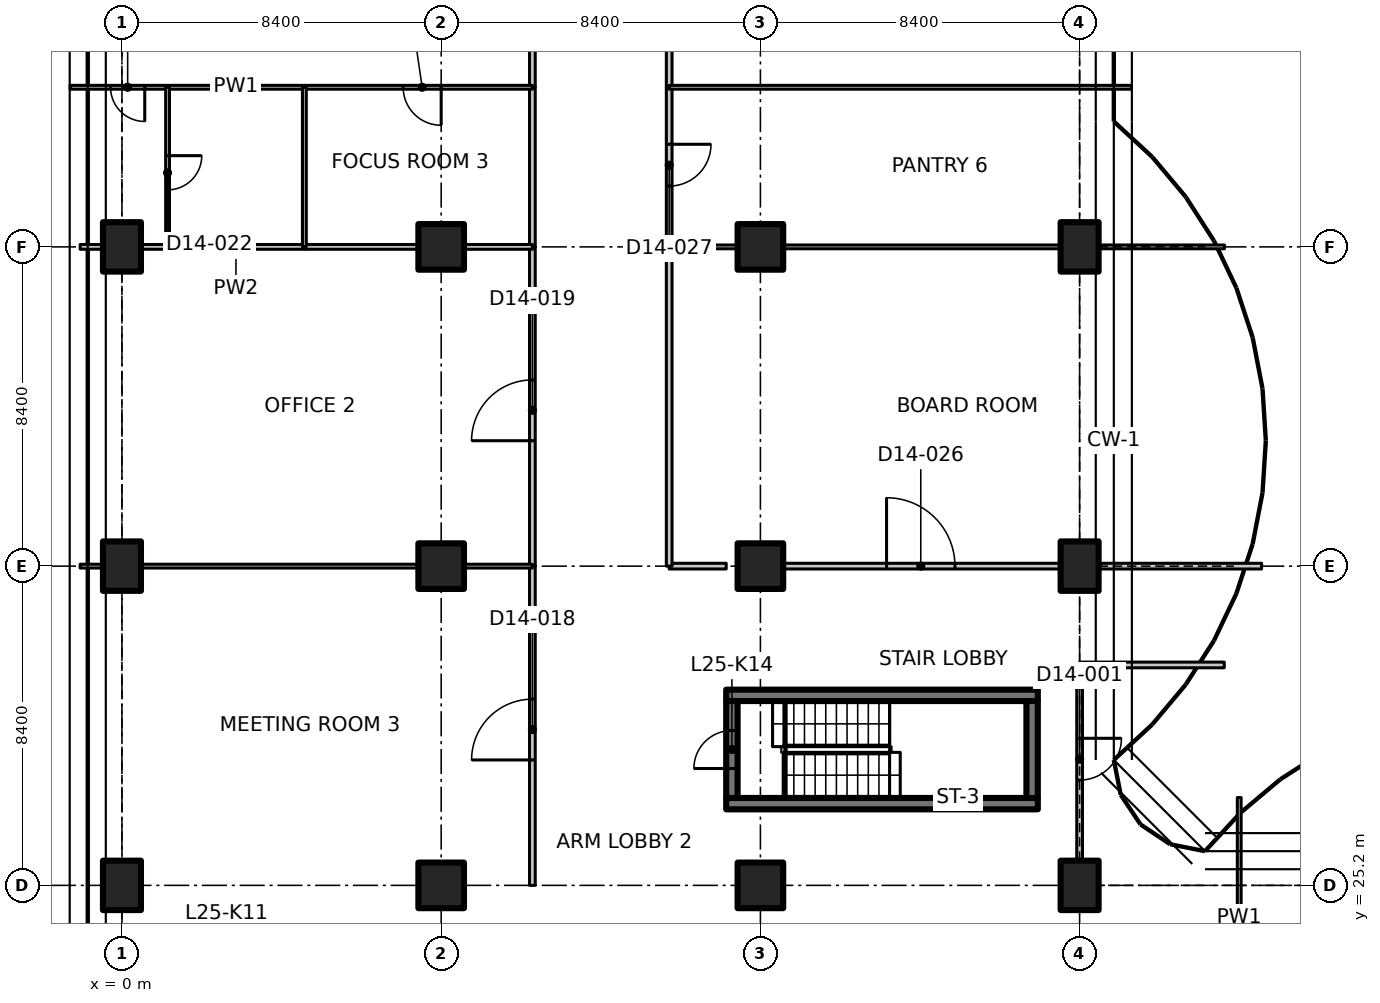
"""IFC4 building model, lengths in metres.
Left out: names, types, materials, properties, quantities, classifications, styles, units other than length and angle.
Written with IfcOpenShell. Run it as: python <this file> out.ifc"""

import sys

from ifc_helpers import new_model, si_unit, direction, frame, frame_2d, origin, origin_2d, place, context, subcontext, project, spatial, polyline, rectangle, outline, extrude, element, fill, save


model = new_model("IFC4")
c1 = context("Model", 3, precision=1e-05, world=origin(), true_north=direction((0.0, 1.0)))
c2 = subcontext(c1, "Body", "Model", "MODEL_VIEW")
j1 = project(units=[si_unit("LENGTHUNIT", "METRE"), si_unit("PLANEANGLEUNIT", "RADIAN")], contexts=[c1])
p1 = place(None, origin())
s1 = spatial("IfcSite", under=j1, at=p1, CompositionType="ELEMENT")
p2 = place(p1, origin())
s2 = spatial("IfcBuilding", under=s1, at=p2, CompositionType="ELEMENT")
p3 = place(p2, frame((0.0, 0.0, 106.1)))
s3 = spatial("IfcBuildingStorey", under=s2, at=p3, CompositionType="ELEMENT", Elevation=106.1)
for number, where, z_axis, x_axis in (
    (1, (0.0, 25.2, 0.0), (0.0, 0.0, 1.0), (1.0, 0.0, 0.0)),
    (2, (0.0, 33.6, 0.0), (0.0, 0.0, 1.0), (1.0, 0.0, 0.0)),
    (3, (0.0, 42.0, 0.0), (0.0, 0.0, 1.0), (1.0, 0.0, 0.0)),
):
    element("IfcColumn", number, at=place(p3, frame(where, z_axis=z_axis, x_axis=x_axis)), inside=s3, PredefinedType="COLUMN", context=c2, shape_type="SweptSolid", body=[
        extrude(rectangle(XDim=1.0, YDim=1.3, at=origin_2d()), origin(), (0.0, 0.0, 1.0), 3.35),
    ])
for number, where, z_axis, x_axis in (
    (4, (8.4, 25.2, 0.0), (0.0, 0.0, 1.0), (1.0, 0.0, 0.0)),
    (5, (8.4, 33.6, 0.0), (0.0, 0.0, 1.0), (1.0, 0.0, 0.0)),
    (6, (8.4, 42.0, 0.0), (0.0, 0.0, 1.0), (1.0, 0.0, 0.0)),
    (7, (16.8, 25.2, 0.0), (0.0, 0.0, 1.0), (1.0, 0.0, 0.0)),
    (8, (16.8, 33.6, 0.0), (0.0, 0.0, 1.0), (1.0, 0.0, 0.0)),
    (9, (16.8, 42.0, 0.0), (0.0, 0.0, 1.0), (1.0, 0.0, 0.0)),
):
    element("IfcColumn", number, at=place(p3, frame(where, z_axis=z_axis, x_axis=x_axis)), inside=s3, PredefinedType="COLUMN", context=c2, shape_type="SweptSolid", body=[
        extrude(rectangle(XDim=1.2, YDim=1.2, at=origin_2d()), origin(), (0.0, 0.0, 1.0), 3.35),
    ])
for number, where, z_axis, x_axis in (
    (10, (25.2, 25.2, 0.0), (0.0, 0.0, 1.0), (1.0, 0.0, 0.0)),
    (11, (25.2, 33.6, 0.0), (0.0, 0.0, 1.0), (1.0, 0.0, 0.0)),
    (12, (25.2, 42.0, 0.0), (0.0, 0.0, 1.0), (1.0, 0.0, 0.0)),
):
    element("IfcColumn", number, at=place(p3, frame(where, z_axis=z_axis, x_axis=x_axis)), inside=s3, PredefinedType="COLUMN", context=c2, shape_type="SweptSolid", body=[
        extrude(rectangle(XDim=1.0, YDim=1.3, at=origin_2d()), origin(), (0.0, 0.0, 1.0), 3.35),
    ])
for number, where, z_axis, x_axis in (
    (13, (15.9, 27.35, 0.0), (0.0, 0.0, 1.0), (1.0, 0.0, 0.0)),
    (14, (15.9, 30.2, 0.0), (0.0, 0.0, 1.0), (1.0, 0.0, 0.0)),
):
    element("IfcWall", number, at=place(p3, frame(where, z_axis=z_axis, x_axis=x_axis)), inside=s3, PredefinedType="SHEAR", context=c2, shape_type="SweptSolid", body=[
        extrude(rectangle(XDim=8.2, YDim=0.3, at=frame_2d((4.1, 0.0))), origin(), (0.0, 0.0, 1.0), 3.35),
    ])
p4 = place(p3, frame((16.05, 27.5, 0.0), z_axis=(0.0, 0.0, 1.0), x_axis=(0.0, 1.0, 0.0)))
e15 = element("IfcWall", 15, at=p4, inside=s3, PredefinedType="SHEAR", context=c2, shape_type="SweptSolid", body=[
    extrude(rectangle(XDim=2.55, YDim=0.3, at=frame_2d((1.275, 0.0))), origin(), (0.0, 0.0, 1.0), 3.35),
])
p5 = place(p4, frame((0.775, 0.0, 0.0)))
e16 = element("IfcOpeningElement", 16, at=p5, cuts=e15, PredefinedType="OPENING", context=c2, shape_type="SweptSolid", body=[
    extrude(rectangle(XDim=1.0, YDim=2.1, at=frame_2d((0.5, 1.05))), frame((0.0, 0.16, 0.0), z_axis=(0.0, -1.0, 0.0), x_axis=(1.0, 0.0, 0.0)), (0.0, 0.0, 1.0), 0.32),
])
p6 = place(p3, frame((23.95, 27.5, 0.0), z_axis=(0.0, 0.0, 1.0), x_axis=(0.0, 1.0, 0.0)))
e17 = element("IfcWall", 17, at=p6, inside=s3, PredefinedType="SHEAR", context=c2, shape_type="SweptSolid", body=[
    extrude(rectangle(XDim=2.55, YDim=0.3, at=frame_2d((1.275, 0.0))), origin(), (0.0, 0.0, 1.0), 3.35),
])
p7 = place(p3, frame((29.4, 27.511, 0.0), z_axis=(0.0, 0.0, 1.0), x_axis=(0.0, -1.0, 0.0)))
e18 = element("IfcWall", 18, at=p7, inside=s3, PredefinedType="PARTITIONING", context=c2, shape_type="SweptSolid", body=[
    extrude(outline(polyline([(0.0, 0.0), (6.311, 0.0), (6.311, 3.33), (2.761, 3.33), (2.759, 2.98), (1.863, 2.98), (1.861, 3.33), (0.236, 3.33), (0.0, 3.33), (0.0, 0.0)])), frame((0.0, 0.05, 0.0), z_axis=(0.0, -1.0, 0.0), x_axis=(1.0, 0.0, 0.0)), (0.0, 0.0, 1.0), 0.1),
])
p8 = place(p3, frame((25.2, 31.0, 0.0), z_axis=(0.0, 0.0, 1.0), x_axis=(0.0, -1.0, 0.0)))
e19 = element("IfcWall", 19, at=p8, inside=s3, PredefinedType="PARTITIONING", context=c2, shape_type="SweptSolid", body=[
    extrude(outline(polyline([(0.0, 0.0), (5.13, 0.0), (5.13, 2.98), (0.0, 2.98), (0.0, 0.0)])), frame((0.0, 0.075, 0.0), z_axis=(0.0, -1.0, 0.0), x_axis=(1.0, 0.0, 0.0)), (0.0, 0.0, 1.0), 0.15),
])
p9 = place(p8, frame((1.93, 0.0, 0.0)))
e20 = element("IfcOpeningElement", 20, at=p9, cuts=e19, PredefinedType="OPENING", context=c2, shape_type="SweptSolid", body=[
    extrude(rectangle(XDim=1.1, YDim=2.1, at=frame_2d((0.55, 1.05))), frame((0.0, 0.085, 0.0), z_axis=(0.0, -1.0, 0.0), x_axis=(1.0, 0.0, 0.0)), (0.0, 0.0, 1.0), 0.17),
])
p10 = place(p3, frame((25.2, 31.0, 0.0), z_axis=(0.0, 0.0, 1.0), x_axis=(1.0, 0.0, 0.0)))
e21 = element("IfcWall", 21, at=p10, inside=s3, PredefinedType="PARTITIONING", context=c2, shape_type="SweptSolid", body=[
    extrude(rectangle(XDim=3.806, YDim=0.15, at=frame_2d((1.903, 0.0))), origin(), (0.0, 0.0, 1.0), 2.98),
])
p11 = place(p3, frame((10.8, 25.2, 0.0), z_axis=(0.0, 0.0, 1.0), x_axis=(0.0, 1.0, 0.0)))
e22 = element("IfcWall", 22, at=p11, inside=s3, PredefinedType="PARTITIONING", context=c2, shape_type="SweptSolid", body=[
    extrude(rectangle(XDim=8.4, YDim=0.15, at=frame_2d((4.2, 0.0))), origin(), (0.0, 0.0, 1.0), 3.33),
])
p12 = place(p11, frame((3.3, 0.0, 0.0)))
e23 = element("IfcOpeningElement", 23, at=p12, cuts=e22, PredefinedType="OPENING", context=c2, shape_type="SweptSolid", body=[
    extrude(rectangle(XDim=1.6, YDim=2.1, at=frame_2d((0.8, 1.05))), frame((0.0, 0.085, 0.0), z_axis=(0.0, -1.0, 0.0), x_axis=(1.0, 0.0, 0.0)), (0.0, 0.0, 1.0), 0.17),
])
p13 = place(p3, frame((14.4, 33.6, 0.0), z_axis=(0.0, 0.0, 1.0), x_axis=(1.0, 0.0, 0.0)))
e24 = element("IfcWall", 24, at=p13, inside=s3, PredefinedType="PARTITIONING", context=c2, shape_type="SweptSolid", body=[
    extrude(rectangle(XDim=1.5, YDim=0.15, at=frame_2d((0.75, 0.0))), origin(), (0.0, 0.0, 1.0), 3.33),
])
p14 = place(p3, frame((17.42, 33.6, 0.0), z_axis=(0.0, 0.0, 1.0), x_axis=(1.0, 0.0, 0.0)))
e25 = element("IfcWall", 25, at=p14, inside=s3, PredefinedType="PARTITIONING", context=c2, shape_type="SweptSolid", body=[
    extrude(rectangle(XDim=7.26, YDim=0.15, at=frame_2d((3.63, 0.0))), origin(), (0.0, 0.0, 1.0), 3.33),
])
p15 = place(p14, frame((2.7, 0.0, 0.0)))
e26 = element("IfcOpeningElement", 26, at=p15, cuts=e25, PredefinedType="OPENING", context=c2, shape_type="SweptSolid", body=[
    extrude(rectangle(XDim=1.8, YDim=2.1, at=frame_2d((0.9, 1.05))), frame((0.0, 0.085, 0.0), z_axis=(0.0, -1.0, 0.0), x_axis=(1.0, 0.0, 0.0)), (0.0, 0.0, 1.0), 0.17),
])
p16 = place(p3, frame((25.72, 33.6, 0.0), z_axis=(0.0, 0.0, 1.0), x_axis=(1.0, 0.0, 0.0)))
e27 = element("IfcWall", 27, at=p16, inside=s3, PredefinedType="PARTITIONING", context=c2, shape_type="SweptSolid", body=[
    extrude(rectangle(XDim=4.268, YDim=0.15, at=frame_2d((2.134, 0.0))), origin(), (0.0, 0.0, 1.0), 2.98),
])
p17 = place(p3, frame((10.8, 33.6, 0.0), z_axis=(0.0, 0.0, 1.0), x_axis=(0.0, 1.0, 0.0)))
e28 = element("IfcWall", 28, at=p17, inside=s3, PredefinedType="PARTITIONING", context=c2, shape_type="SweptSolid", body=[
    extrude(rectangle(XDim=8.4, YDim=0.15, at=frame_2d((4.2, 0.0))), origin(), (0.0, 0.0, 1.0), 3.33),
])
p18 = place(p17, frame((3.3, 0.0, 0.0)))
e29 = element("IfcOpeningElement", 29, at=p18, cuts=e28, PredefinedType="OPENING", context=c2, shape_type="SweptSolid", body=[
    extrude(rectangle(XDim=1.6, YDim=2.1, at=frame_2d((0.8, 1.05))), frame((0.0, 0.085, 0.0), z_axis=(0.0, -1.0, 0.0), x_axis=(1.0, 0.0, 0.0)), (0.0, 0.0, 1.0), 0.17),
])
p19 = place(p3, frame((10.8, 46.2, 0.0), z_axis=(0.0, 0.0, 1.0), x_axis=(0.0, 1.0, 0.0)))
e30 = element("IfcWall", 30, at=p19, inside=s3, PredefinedType="PARTITIONING", context=c2, shape_type="SweptSolid", body=[
    extrude(rectangle(XDim=8.4, YDim=0.15, at=frame_2d((4.2, 0.0))), origin(), (0.0, 0.0, 1.0), 3.33),
])
p20 = place(p19, frame((3.3, 0.0, 0.0)))
e31 = element("IfcOpeningElement", 31, at=p20, cuts=e30, PredefinedType="OPENING", context=c2, shape_type="SweptSolid", body=[
    extrude(rectangle(XDim=1.6, YDim=2.1, at=frame_2d((0.8, 1.05))), frame((0.0, 0.085, 0.0), z_axis=(0.0, -1.0, 0.0), x_axis=(1.0, 0.0, 0.0)), (0.0, 0.0, 1.0), 0.17),
])
p21 = place(p3, frame((10.8, 42.0, 0.0), z_axis=(0.0, 0.0, 1.0), x_axis=(0.0, 1.0, 0.0)))
e32 = element("IfcWall", 32, at=p21, inside=s3, PredefinedType="PARTITIONING", context=c2, shape_type="SweptSolid", body=[
    extrude(rectangle(XDim=4.2, YDim=0.15, at=frame_2d((2.1, 0.0))), origin(), (0.0, 0.0, 1.0), 3.33),
])
p22 = place(p3, frame((14.4, 42.0, 0.0), z_axis=(0.0, 0.0, 1.0), x_axis=(0.0, -1.0, 0.0)))
e33 = element("IfcWall", 33, at=p22, inside=s3, PredefinedType="PARTITIONING", context=c2, shape_type="SweptSolid", body=[
    extrude(rectangle(XDim=8.4, YDim=0.15, at=frame_2d((4.2, 0.0))), origin(), (0.0, 0.0, 1.0), 3.33),
])
p23 = place(p3, frame((14.4, 46.2, 0.0), z_axis=(0.0, 0.0, 1.0), x_axis=(0.0, -1.0, 0.0)))
e34 = element("IfcWall", 34, at=p23, inside=s3, PredefinedType="PARTITIONING", context=c2, shape_type="SweptSolid", body=[
    extrude(rectangle(XDim=4.2, YDim=0.15, at=frame_2d((2.1, 0.0))), origin(), (0.0, 0.0, 1.0), 3.33),
])
p24 = place(p23, frame((1.5, 0.0, 0.0)))
e35 = element("IfcOpeningElement", 35, at=p24, cuts=e34, PredefinedType="OPENING", context=c2, shape_type="SweptSolid", body=[
    extrude(rectangle(XDim=1.1, YDim=2.1, at=frame_2d((0.55, 1.05))), frame((0.0, 0.085, 0.0), z_axis=(0.0, -1.0, 0.0), x_axis=(1.0, 0.0, 0.0)), (0.0, 0.0, 1.0), 0.17),
])
p25 = place(p3, frame((14.4, 50.4, 0.0), z_axis=(0.0, 0.0, 1.0), x_axis=(0.0, -1.0, 0.0)))
e36 = element("IfcWall", 36, at=p25, inside=s3, PredefinedType="PARTITIONING", context=c2, shape_type="SweptSolid", body=[
    extrude(rectangle(XDim=4.2, YDim=0.15, at=frame_2d((2.1, 0.0))), origin(), (0.0, 0.0, 1.0), 3.33),
])
p26 = place(p25, frame((1.5, 0.0, 0.0)))
e37 = element("IfcOpeningElement", 37, at=p26, cuts=e36, PredefinedType="OPENING", context=c2, shape_type="SweptSolid", body=[
    extrude(rectangle(XDim=1.1, YDim=2.1, at=frame_2d((0.55, 1.05))), frame((0.0, 0.085, 0.0), z_axis=(0.0, -1.0, 0.0), x_axis=(1.0, 0.0, 0.0)), (0.0, 0.0, 1.0), 0.17),
])
p27 = place(p3, frame((-1.1, 33.6, 0.0), z_axis=(0.0, 0.0, 1.0), x_axis=(1.0, 0.0, 0.0)))
e38 = element("IfcWall", 38, at=p27, inside=s3, PredefinedType="PARTITIONING", context=c2, shape_type="SweptSolid", body=[
    extrude(rectangle(XDim=0.58, YDim=0.1, at=frame_2d((0.29, 0.0))), origin(), (0.0, 0.0, 1.0), 3.33),
])
p28 = place(p3, frame((0.52, 33.6, 0.0), z_axis=(0.0, 0.0, 1.0), x_axis=(1.0, 0.0, 0.0)))
e39 = element("IfcWall", 39, at=p28, inside=s3, PredefinedType="PARTITIONING", context=c2, shape_type="SweptSolid", body=[
    extrude(rectangle(XDim=7.26, YDim=0.1, at=frame_2d((3.63, 0.0))), origin(), (0.0, 0.0, 1.0), 3.33),
])
p29 = place(p3, frame((9.02, 33.6, 0.0), z_axis=(0.0, 0.0, 1.0), x_axis=(1.0, 0.0, 0.0)))
e40 = element("IfcWall", 40, at=p29, inside=s3, PredefinedType="PARTITIONING", context=c2, shape_type="SweptSolid", body=[
    extrude(rectangle(XDim=1.78, YDim=0.1, at=frame_2d((0.89, 0.0))), origin(), (0.0, 0.0, 1.0), 3.33),
])
p30 = place(p3, frame((-1.1, 42.0, 0.0), z_axis=(0.0, 0.0, 1.0), x_axis=(1.0, 0.0, 0.0)))
e41 = element("IfcWall", 41, at=p30, inside=s3, PredefinedType="PARTITIONING", context=c2, shape_type="SweptSolid", body=[
    extrude(rectangle(XDim=0.58, YDim=0.125, at=frame_2d((0.29, 0.0))), origin(), (0.0, 0.0, 1.0), 3.33),
])
p31 = place(p3, frame((0.52, 42.0, 0.0), z_axis=(0.0, 0.0, 1.0), x_axis=(1.0, 0.0, 0.0)))
e42 = element("IfcWall", 42, at=p31, inside=s3, PredefinedType="PARTITIONING", context=c2, shape_type="SweptSolid", body=[
    extrude(rectangle(XDim=0.68, YDim=0.125, at=frame_2d((0.34, 0.0))), origin(), (0.0, 0.0, 1.0), 3.33),
])
p32 = place(p3, frame((1.2, 42.0, 0.0), z_axis=(0.0, 0.0, 1.0), x_axis=(1.0, 0.0, 0.0)))
e43 = element("IfcWall", 43, at=p32, inside=s3, PredefinedType="PARTITIONING", context=c2, shape_type="SweptSolid", body=[
    extrude(rectangle(XDim=3.6, YDim=0.125, at=frame_2d((1.8, 0.0))), origin(), (0.0, 0.0, 1.0), 3.33),
])
p33 = place(p3, frame((4.8, 42.0, 0.0), z_axis=(0.0, 0.0, 1.0), x_axis=(1.0, 0.0, 0.0)))
e44 = element("IfcWall", 44, at=p33, inside=s3, PredefinedType="PARTITIONING", context=c2, shape_type="SweptSolid", body=[
    extrude(rectangle(XDim=2.98, YDim=0.125, at=frame_2d((1.49, 0.0))), origin(), (0.0, 0.0, 1.0), 3.33),
])
p34 = place(p3, frame((9.02, 42.0, 0.0), z_axis=(0.0, 0.0, 1.0), x_axis=(1.0, 0.0, 0.0)))
e45 = element("IfcWall", 45, at=p34, inside=s3, PredefinedType="PARTITIONING", context=c2, shape_type="SweptSolid", body=[
    extrude(rectangle(XDim=1.78, YDim=0.125, at=frame_2d((0.89, 0.0))), origin(), (0.0, 0.0, 1.0), 3.33),
])
p35 = place(p3, frame((1.2, 46.2, 0.0), z_axis=(0.0, 0.0, 1.0), x_axis=(-1.0, 0.0, 0.0)))
e46 = element("IfcWall", 46, at=p35, inside=s3, PredefinedType="PARTITIONING", context=c2, shape_type="SweptSolid", body=[
    extrude(rectangle(XDim=2.565, YDim=0.1, at=frame_2d((1.282, 0.0))), origin(), (0.0, 0.0, 1.0), 2.98),
])
p36 = place(p35, frame((0.6, 0.0, 0.0)))
e47 = element("IfcOpeningElement", 47, at=p36, cuts=e46, PredefinedType="OPENING", context=c2, shape_type="SweptSolid", body=[
    extrude(rectangle(XDim=0.9, YDim=2.1, at=frame_2d((0.45, 1.05))), frame((0.0, 0.06, 0.0), z_axis=(0.0, -1.0, 0.0), x_axis=(1.0, 0.0, 0.0)), (0.0, 0.0, 1.0), 0.12),
])
p37 = place(p3, frame((4.8, 46.2, 0.0), z_axis=(0.0, 0.0, 1.0), x_axis=(-1.0, 0.0, 0.0)))
e48 = element("IfcWall", 48, at=p37, inside=s3, PredefinedType="PARTITIONING", context=c2, shape_type="SweptSolid", body=[
    extrude(rectangle(XDim=3.6, YDim=0.1, at=frame_2d((1.8, 0.0))), origin(), (0.0, 0.0, 1.0), 3.33),
])
p38 = place(p3, frame((10.8, 46.2, 0.0), z_axis=(0.0, 0.0, 1.0), x_axis=(-1.0, 0.0, 0.0)))
e49 = element("IfcWall", 49, at=p38, inside=s3, PredefinedType="PARTITIONING", context=c2, shape_type="SweptSolid", body=[
    extrude(rectangle(XDim=6.0, YDim=0.1, at=frame_2d((3.0, 0.0))), origin(), (0.0, 0.0, 1.0), 3.33),
])
p39 = place(p38, frame((2.4, 0.0, 0.0)))
e50 = element("IfcOpeningElement", 50, at=p39, cuts=e49, PredefinedType="OPENING", context=c2, shape_type="SweptSolid", body=[
    extrude(rectangle(XDim=1.0, YDim=2.1, at=frame_2d((0.5, 1.05))), frame((0.0, 0.06, 0.0), z_axis=(0.0, -1.0, 0.0), x_axis=(1.0, 0.0, 0.0)), (0.0, 0.0, 1.0), 0.12),
])
p40 = place(p3, frame((1.2, 46.2, 0.0), z_axis=(0.0, 0.0, 1.0), x_axis=(0.0, -1.0, 0.0)))
e51 = element("IfcWall", 51, at=p40, inside=s3, PredefinedType="PARTITIONING", context=c2, shape_type="SweptSolid", body=[
    extrude(rectangle(XDim=4.2, YDim=0.1, at=frame_2d((2.1, 0.0))), origin(), (0.0, 0.0, 1.0), 3.33),
])
p41 = place(p40, frame((1.8, 0.0, 0.0)))
e52 = element("IfcOpeningElement", 52, at=p41, cuts=e51, PredefinedType="OPENING", context=c2, shape_type="SweptSolid", body=[
    extrude(rectangle(XDim=0.9, YDim=2.1, at=frame_2d((0.45, 1.05))), frame((0.0, 0.06, 0.0), z_axis=(0.0, -1.0, 0.0), x_axis=(1.0, 0.0, 0.0)), (0.0, 0.0, 1.0), 0.12),
])
p42 = place(p3, frame((4.8, 46.2, 0.0), z_axis=(0.0, 0.0, 1.0), x_axis=(0.0, -1.0, 0.0)))
e53 = element("IfcWall", 53, at=p42, inside=s3, PredefinedType="PARTITIONING", context=c2, shape_type="SweptSolid", body=[
    extrude(rectangle(XDim=4.2, YDim=0.1, at=frame_2d((2.1, 0.0))), origin(), (0.0, 0.0, 1.0), 3.33),
])
p43 = place(p3, frame((14.4, 42.0, 0.0), z_axis=(0.0, 0.0, 1.0), x_axis=(1.0, 0.0, 0.0)))
e54 = element("IfcWall", 54, at=p43, inside=s3, PredefinedType="PARTITIONING", context=c2, shape_type="SweptSolid", body=[
    extrude(rectangle(XDim=1.78, YDim=0.1, at=frame_2d((0.89, 0.0))), origin(), (0.0, 0.0, 1.0), 3.33),
])
p44 = place(p3, frame((17.42, 42.0, 0.0), z_axis=(0.0, 0.0, 1.0), x_axis=(1.0, 0.0, 0.0)))
e55 = element("IfcWall", 55, at=p44, inside=s3, PredefinedType="PARTITIONING", context=c2, shape_type="SweptSolid", body=[
    extrude(rectangle(XDim=7.26, YDim=0.1, at=frame_2d((3.63, 0.0))), origin(), (0.0, 0.0, 1.0), 3.33),
])
p45 = place(p3, frame((25.72, 42.0, 0.0), z_axis=(0.0, 0.0, 1.0), x_axis=(1.0, 0.0, 0.0)))
e56 = element("IfcWall", 56, at=p45, inside=s3, PredefinedType="PARTITIONING", context=c2, shape_type="SweptSolid", body=[
    extrude(rectangle(XDim=3.292, YDim=0.1, at=frame_2d((1.646, 0.0))), origin(), (0.0, 0.0, 1.0), 2.98),
])
p46 = place(p3, frame((14.4, 46.2, 0.0), z_axis=(0.0, 0.0, 1.0), x_axis=(1.0, 0.0, 0.0)))
e57 = element("IfcWall", 57, at=p46, inside=s3, PredefinedType="PARTITIONING", context=c2, shape_type="SweptSolid", body=[
    extrude(outline(polyline([(0.0, 0.0), (12.165, 0.0), (12.165, 3.33), (11.9, 3.33), (11.25, 3.33), (11.248, 2.98), (10.352, 2.98), (10.35, 3.33), (0.0, 3.33), (0.0, 0.0)])), frame((0.0, 0.05, 0.0), z_axis=(0.0, -1.0, 0.0), x_axis=(1.0, 0.0, 0.0)), (0.0, 0.0, 1.0), 0.1),
])
p47 = place(p5, origin())
e58 = element("IfcDoor", 58, at=p47, inside=s3, OperationType="SINGLE_SWING_RIGHT", PredefinedType="DOOR", context=c2, shape_type="SweptSolid", body=[
    extrude(rectangle(XDim=1.0, YDim=2.1, at=frame_2d((0.5, 1.05))), frame((0.0, 0.025, 0.0), z_axis=(0.0, -1.0, 0.0), x_axis=(1.0, 0.0, 0.0)), (0.0, 0.0, 1.0), 0.05),
])
fill(e16, e58)
p48 = place(p9, origin())
e59 = element("IfcDoor", 59, at=p48, inside=s3, OperationType="SINGLE_SWING_RIGHT", PredefinedType="DOOR", context=c2, shape_type="SweptSolid", body=[
    extrude(rectangle(XDim=1.1, YDim=2.1, at=frame_2d((0.55, 1.05))), frame((0.0, 0.025, 0.0), z_axis=(0.0, -1.0, 0.0), x_axis=(1.0, 0.0, 0.0)), (0.0, 0.0, 1.0), 0.05),
])
fill(e20, e59)
p49 = place(p12, origin())
e60 = element("IfcDoor", 60, at=p49, inside=s3, OperationType="DOUBLE_DOOR_SINGLE_SWING", PredefinedType="DOOR", context=c2, shape_type="SweptSolid", body=[
    extrude(rectangle(XDim=1.6, YDim=2.1, at=frame_2d((0.8, 1.05))), frame((0.0, 0.025, 0.0), z_axis=(0.0, -1.0, 0.0), x_axis=(1.0, 0.0, 0.0)), (0.0, 0.0, 1.0), 0.05),
])
fill(e23, e60)
p50 = place(p18, origin())
e61 = element("IfcDoor", 61, at=p50, inside=s3, OperationType="DOUBLE_DOOR_SINGLE_SWING", PredefinedType="DOOR", context=c2, shape_type="SweptSolid", body=[
    extrude(rectangle(XDim=1.6, YDim=2.1, at=frame_2d((0.8, 1.05))), frame((0.0, 0.025, 0.0), z_axis=(0.0, -1.0, 0.0), x_axis=(1.0, 0.0, 0.0)), (0.0, 0.0, 1.0), 0.05),
])
fill(e29, e61)
p51 = place(p36, origin())
e62 = element("IfcDoor", 62, at=p51, inside=s3, OperationType="SINGLE_SWING_LEFT", PredefinedType="DOOR", context=c2, shape_type="SweptSolid", body=[
    extrude(rectangle(XDim=0.9, YDim=2.1, at=frame_2d((0.45, 1.05))), frame((0.0, 0.025, 0.0), z_axis=(0.0, -1.0, 0.0), x_axis=(1.0, 0.0, 0.0)), (0.0, 0.0, 1.0), 0.05),
])
fill(e47, e62)
p52 = place(p41, origin())
e63 = element("IfcDoor", 63, at=p52, inside=s3, OperationType="SINGLE_SWING_LEFT", PredefinedType="DOOR", context=c2, shape_type="SweptSolid", body=[
    extrude(rectangle(XDim=0.9, YDim=2.1, at=frame_2d((0.45, 1.05))), frame((0.0, 0.025, 0.0), z_axis=(0.0, -1.0, 0.0), x_axis=(1.0, 0.0, 0.0)), (0.0, 0.0, 1.0), 0.05),
])
fill(e52, e63)
p53 = place(p39, origin())
e64 = element("IfcDoor", 64, at=p53, inside=s3, OperationType="SINGLE_SWING_LEFT", PredefinedType="DOOR", context=c2, shape_type="SweptSolid", body=[
    extrude(rectangle(XDim=1.0, YDim=2.1, at=frame_2d((0.5, 1.05))), frame((0.0, 0.025, 0.0), z_axis=(0.0, -1.0, 0.0), x_axis=(1.0, 0.0, 0.0)), (0.0, 0.0, 1.0), 0.05),
])
fill(e50, e64)
p54 = place(p15, origin())
e65 = element("IfcDoor", 65, at=p54, inside=s3, OperationType="DOUBLE_DOOR_SINGLE_SWING", PredefinedType="DOOR", context=c2, shape_type="SweptSolid", body=[
    extrude(rectangle(XDim=1.8, YDim=2.1, at=frame_2d((0.9, 1.05))), frame((0.0, 0.025, 0.0), z_axis=(0.0, -1.0, 0.0), x_axis=(1.0, 0.0, 0.0)), (0.0, 0.0, 1.0), 0.05),
])
fill(e26, e65)
p55 = place(p24, origin())
e66 = element("IfcDoor", 66, at=p55, inside=s3, OperationType="SINGLE_SWING_LEFT", PredefinedType="DOOR", context=c2, shape_type="SweptSolid", body=[
    extrude(rectangle(XDim=1.1, YDim=2.1, at=frame_2d((0.55, 1.05))), frame((0.0, 0.025, 0.0), z_axis=(0.0, -1.0, 0.0), x_axis=(1.0, 0.0, 0.0)), (0.0, 0.0, 1.0), 0.05),
])
fill(e35, e66)
save(model, sys.argv[1])
